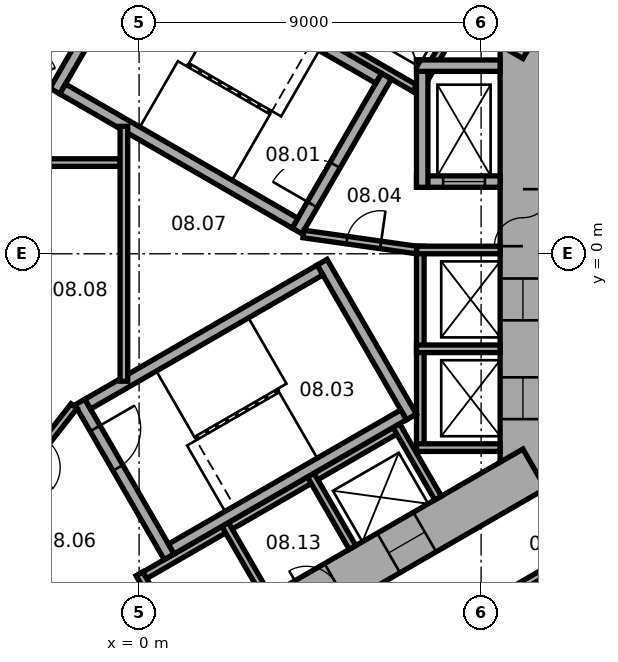
"""IFC4 building model, lengths in metres.
Left out: names, types, materials, properties, quantities, classifications, styles, units other than length and angle.
Written with IfcOpenShell. Run it as: python <this file> out.ifc"""

import sys

from ifc_helpers import new_model, si_unit, direction, frame, frame_2d, origin, place, context, subcontext, project, spatial, rectangle, extrude, element, fill, save


model = new_model("IFC4")
c1 = context("Model", 3, precision=1e-05, world=origin(), true_north=direction((0.0, 1.0)))
c2 = subcontext(c1, "Body", "Model", "MODEL_VIEW")
j1 = project(units=[si_unit("LENGTHUNIT", "METRE"), si_unit("PLANEANGLEUNIT", "RADIAN")], contexts=[c1])
p1 = place(None, origin())
s1 = spatial("IfcSite", under=j1, at=p1, CompositionType="ELEMENT")
p2 = place(p1, origin())
s2 = spatial("IfcBuilding", under=s1, at=p2, CompositionType="ELEMENT")
p3 = place(p2, frame((0.0, 0.0, 47.3)))
s3 = spatial("IfcBuildingStorey", under=s2, at=p3, CompositionType="ELEMENT", Elevation=47.3)
p4 = place(p3, frame((10.1, -6.177, 0.0), z_axis=(0.0, 0.0, 1.0), x_axis=(0.0, 1.0, 0.0)))
e1 = element("IfcWall", 1, at=p4, inside=s3, PredefinedType="SHEAR", context=c2, shape_type="SweptSolid", body=[
    extrude(rectangle(XDim=12.355, YDim=1.2, at=frame_2d((6.177, 0.0))), origin(), (0.0, 0.0, 1.0), 3.3),
])
p5 = place(p4, frame((6.378, 0.0, 0.0)))
e2 = element("IfcOpeningElement", 2, at=p5, cuts=e1, PredefinedType="OPENING", context=c2, shape_type="SweptSolid", body=[
    extrude(rectangle(XDim=1.5, YDim=2.1, at=frame_2d((0.75, 1.05))), frame((0.0, 0.61, 0.0), z_axis=(0.0, -1.0, 0.0), x_axis=(1.0, 0.0, 0.0)), (0.0, 0.0, 1.0), 1.22),
])
p6 = place(p4, frame((1.828, 0.0, 0.0)))
e3 = element("IfcOpeningElement", 3, at=p6, cuts=e1, PredefinedType="OPENING", context=c2, shape_type="SweptSolid", body=[
    extrude(rectangle(XDim=1.1, YDim=2.1, at=frame_2d((0.55, 1.05))), frame((0.0, 0.61, 0.0), z_axis=(0.0, -1.0, 0.0), x_axis=(1.0, 0.0, 0.0)), (0.0, 0.0, 1.0), 1.22),
])
p7 = place(p4, frame((4.427, 0.0, 0.0)))
e4 = element("IfcOpeningElement", 4, at=p7, cuts=e1, PredefinedType="OPENING", context=c2, shape_type="SweptSolid", body=[
    extrude(rectangle(XDim=1.1, YDim=2.1, at=frame_2d((0.55, 1.05))), frame((0.0, 0.61, 0.0), z_axis=(0.0, -1.0, 0.0), x_axis=(1.0, 0.0, 0.0)), (0.0, 0.0, 1.0), 1.22),
])
p8 = place(p3, frame((10.4, 5.658, 0.0), z_axis=(0.0, 0.0, 1.0), x_axis=(-0.866021384402, 0.500006961711, 0.0)))
e5 = element("IfcWall", 5, at=p8, inside=s3, PredefinedType="SHEAR", context=c2, shape_type="SweptSolid", body=[
    extrude(rectangle(XDim=12.355, YDim=1.2, at=frame_2d((6.178, 0.0))), origin(), (0.0, 0.0, 1.0), 3.3),
])
p9 = place(p8, frame((2.728, 0.0, 0.0)))
e6 = element("IfcOpeningElement", 6, at=p9, cuts=e5, PredefinedType="OPENING", context=c2, shape_type="SweptSolid", body=[
    extrude(rectangle(XDim=1.1, YDim=2.1, at=frame_2d((0.55, 1.05))), frame((0.0, 0.61, 0.0), z_axis=(0.0, -1.0, 0.0), x_axis=(1.0, 0.0, 0.0)), (0.0, 0.0, 1.0), 1.22),
])
p10 = place(p8, frame((5.328, 0.0, 0.0)))
e7 = element("IfcOpeningElement", 7, at=p10, cuts=e5, PredefinedType="OPENING", context=c2, shape_type="SweptSolid", body=[
    extrude(rectangle(XDim=1.1, YDim=2.1, at=frame_2d((0.55, 1.05))), frame((0.0, 0.61, 0.0), z_axis=(0.0, -1.0, 0.0), x_axis=(1.0, 0.0, 0.0)), (0.0, 0.0, 1.0), 1.22),
])
p11 = place(p8, frame((7.928, 0.0, 0.0)))
e8 = element("IfcOpeningElement", 8, at=p11, cuts=e5, PredefinedType="OPENING", context=c2, shape_type="SweptSolid", body=[
    extrude(rectangle(XDim=1.1, YDim=2.1, at=frame_2d((0.55, 1.05))), frame((0.0, 0.61, 0.0), z_axis=(0.0, -1.0, 0.0), x_axis=(1.0, 0.0, 0.0)), (0.0, 0.0, 1.0), 1.22),
])
p12 = place(p3, frame((0.3, 11.836, 0.0), z_axis=(0.0, 0.0, 1.0), x_axis=(-0.866021384402, -0.500006961711, 0.0)))
e9 = element("IfcWall", 9, at=p12, inside=s3, PredefinedType="SHEAR", context=c2, shape_type="SweptSolid", body=[
    extrude(rectangle(XDim=12.355, YDim=1.2, at=frame_2d((6.178, 0.0))), origin(), (0.0, 0.0, 1.0), 3.3),
])
p13 = place(p12, frame((6.378, 0.0, 0.0)))
e10 = element("IfcOpeningElement", 10, at=p13, cuts=e9, PredefinedType="OPENING", context=c2, shape_type="SweptSolid", body=[
    extrude(rectangle(XDim=1.5, YDim=2.1, at=frame_2d((0.75, 1.05))), frame((0.0, 0.61, 0.0), z_axis=(0.0, -1.0, 0.0), x_axis=(1.0, 0.0, 0.0)), (0.0, 0.0, 1.0), 1.22),
])
p14 = place(p12, frame((1.828, 0.0, 0.0)))
e11 = element("IfcOpeningElement", 11, at=p14, cuts=e9, PredefinedType="OPENING", context=c2, shape_type="SweptSolid", body=[
    extrude(rectangle(XDim=1.1, YDim=2.1, at=frame_2d((0.55, 1.05))), frame((0.0, 0.61, 0.0), z_axis=(0.0, -1.0, 0.0), x_axis=(1.0, 0.0, 0.0)), (0.0, 0.0, 1.0), 1.22),
])
p15 = place(p3, frame((-10.4, -5.658, 0.0), z_axis=(0.0, 0.0, 1.0), x_axis=(0.866021384402, -0.500006961711, 0.0)))
e12 = element("IfcWall", 12, at=p15, inside=s3, PredefinedType="SHEAR", context=c2, shape_type="SweptSolid", body=[
    extrude(rectangle(XDim=12.355, YDim=1.2, at=frame_2d((6.178, 0.0))), origin(), (0.0, 0.0, 1.0), 3.3),
])
p16 = place(p15, frame((6.378, 0.0, 0.0)))
e13 = element("IfcOpeningElement", 13, at=p16, cuts=e12, PredefinedType="OPENING", context=c2, shape_type="SweptSolid", body=[
    extrude(rectangle(XDim=1.5, YDim=2.1, at=frame_2d((0.75, 1.05))), frame((0.0, 0.61, 0.0), z_axis=(0.0, -1.0, 0.0), x_axis=(1.0, 0.0, 0.0)), (0.0, 0.0, 1.0), 1.22),
])
p17 = place(p15, frame((3.228, 0.0, 0.0)))
e14 = element("IfcOpeningElement", 14, at=p17, cuts=e12, PredefinedType="OPENING", context=c2, shape_type="SweptSolid", body=[
    extrude(rectangle(XDim=0.9, YDim=2.1, at=frame_2d((0.45, 1.05))), frame((0.0, 0.61, 0.0), z_axis=(0.0, -1.0, 0.0), x_axis=(1.0, 0.0, 0.0)), (0.0, 0.0, 1.0), 1.22),
])
p18 = place(p3, frame((-0.3, -11.836, 0.0), z_axis=(0.0, 0.0, 1.0), x_axis=(0.866021384402, 0.500006961711, 0.0)))
e15 = element("IfcWall", 15, at=p18, inside=s3, PredefinedType="SHEAR", context=c2, shape_type="SweptSolid", body=[
    extrude(rectangle(XDim=12.355, YDim=1.2, at=frame_2d((6.178, 0.0))), origin(), (0.0, 0.0, 1.0), 3.3),
])
p19 = place(p18, frame((2.828, 0.0, 0.0)))
e16 = element("IfcOpeningElement", 16, at=p19, cuts=e15, PredefinedType="OPENING", context=c2, shape_type="SweptSolid", body=[
    extrude(rectangle(XDim=0.9, YDim=2.1, at=frame_2d((0.45, 1.05))), frame((0.0, 0.61, 0.0), z_axis=(0.0, -1.0, 0.0), x_axis=(1.0, 0.0, 0.0)), (0.0, 0.0, 1.0), 1.22),
])
p20 = place(p18, frame((5.428, 0.0, 0.0)))
e17 = element("IfcOpeningElement", 17, at=p20, cuts=e15, PredefinedType="OPENING", context=c2, shape_type="SweptSolid", body=[
    extrude(rectangle(XDim=0.9, YDim=2.1, at=frame_2d((0.45, 1.05))), frame((0.0, 0.61, 0.0), z_axis=(0.0, -1.0, 0.0), x_axis=(1.0, 0.0, 0.0)), (0.0, 0.0, 1.0), 1.22),
])
p21 = place(p18, frame((7.928, 0.0, 0.0)))
e18 = element("IfcOpeningElement", 18, at=p21, cuts=e15, PredefinedType="OPENING", context=c2, shape_type="SweptSolid", body=[
    extrude(rectangle(XDim=1.1, YDim=2.1, at=frame_2d((0.55, 1.05))), frame((0.0, 0.61, 0.0), z_axis=(0.0, -1.0, 0.0), x_axis=(1.0, 0.0, 0.0)), (0.0, 0.0, 1.0), 1.22),
])
p22 = place(p3, frame((7.4, -5.2, 0.0), z_axis=(0.0, 0.0, 1.0), x_axis=(0.0, 1.0, 0.0)))
e19 = element("IfcWall", 19, at=p22, inside=s3, PredefinedType="PARTITIONING", context=c2, shape_type="SweptSolid", body=[
    extrude(rectangle(XDim=5.4, YDim=0.2, at=frame_2d((2.7, 0.0))), origin(), (0.0, 0.0, 1.0), 3.05),
])
for number, where, z_axis, x_axis in (
    (20, (7.3, -5.1, 0.0), (0.0, 0.0, 1.0), (1.0, 0.0, 0.0)),
    (21, (7.3, -2.5, 0.0), (0.0, 0.0, 1.0), (1.0, 0.0, 0.0)),
    (22, (7.3, 0.1, 0.0), (0.0, 0.0, 1.0), (1.0, 0.0, 0.0)),
):
    element("IfcWall", number, at=place(p3, frame(where, z_axis=z_axis, x_axis=x_axis)), inside=s3, PredefinedType="PARTITIONING", context=c2, shape_type="SweptSolid", body=[
        extrude(rectangle(XDim=2.2, YDim=0.2, at=frame_2d((1.1, 0.0))), origin(), (0.0, 0.0, 1.0), 3.05),
    ])
p23 = place(p3, frame((7.424, 4.259, 0.0), z_axis=(0.0, 0.0, 1.0), x_axis=(-0.866026010844, 0.49999894854, 0.0)))
e23 = element("IfcWall", 23, at=p23, inside=s3, PredefinedType="PARTITIONING", context=c2, shape_type="SweptSolid", body=[
    extrude(rectangle(XDim=8.0, YDim=0.2, at=frame_2d((4.0, 0.0))), origin(), (0.0, 0.0, 1.0), 3.05),
])
p24 = place(p3, frame((7.287, 4.222, 0.0), z_axis=(0.0, 0.0, 1.0), x_axis=(0.499946605688, 0.86605622881, 0.0)))
e24 = element("IfcWall", 24, at=p24, inside=s3, PredefinedType="PARTITIONING", context=c2, shape_type="SweptSolid", body=[
    extrude(rectangle(XDim=2.2, YDim=0.2, at=frame_2d((1.1, 0.0))), origin(), (0.0, 0.0, 1.0), 3.05),
])
p25 = place(p3, frame((-0.024, -8.559, 0.0), z_axis=(0.0, 0.0, 1.0), x_axis=(0.866026010844, 0.49999894854, 0.0)))
e25 = element("IfcWall", 25, at=p25, inside=s3, PredefinedType="PARTITIONING", context=c2, shape_type="SweptSolid", body=[
    extrude(rectangle(XDim=8.0, YDim=0.2, at=frame_2d((4.0, 0.0))), origin(), (0.0, 0.0, 1.0), 3.05),
])
for number, where, z_axis, x_axis in (
    (26, (0.013, -8.422, 0.0), (0.0, 0.0, 1.0), (0.5, -0.866, 0.0)),
    (27, (2.264, -7.122, 0.0), (0.0, 0.0, 1.0), (0.5, -0.866, 0.0)),
    (28, (4.516, -5.822, 0.0), (0.0, 0.0, 1.0), (0.5, -0.866, 0.0)),
    (29, (6.768, -4.522, 0.0), (0.0, 0.0, 1.0), (0.5, -0.866, 0.0)),
):
    element("IfcWall", number, at=place(p3, frame(where, z_axis=z_axis, x_axis=x_axis)), inside=s3, PredefinedType="PARTITIONING", context=c2, shape_type="SweptSolid", body=[
        extrude(rectangle(XDim=2.2, YDim=0.2, at=frame_2d((1.1, 0.0))), origin(), (0.0, 0.0, 1.0), 3.05),
    ])
p26 = place(p3, frame((4.158, 0.602, 0.0), z_axis=(0.0, 0.0, 1.0), x_axis=(0.499977259774, 0.866038532462, 0.0)))
e30 = element("IfcWall", 30, at=p26, inside=s3, PredefinedType="SHEAR", context=c2, shape_type="SweptSolid", body=[
    extrude(rectangle(XDim=4.7, YDim=0.3, at=frame_2d((2.35, 0.0))), origin(), (0.0, 0.0, 1.0), 3.05),
])
p27 = place(p26, frame((0.8, 0.0, 0.0)))
e31 = element("IfcOpeningElement", 31, at=p27, cuts=e30, PredefinedType="OPENING", context=c2, shape_type="SweptSolid", body=[
    extrude(rectangle(XDim=1.2, YDim=2.1, at=frame_2d((0.6, 1.05))), frame((0.0, 0.16, 0.0), z_axis=(0.0, -1.0, 0.0), x_axis=(1.0, 0.0, 0.0)), (0.0, 0.0, 1.0), 0.32),
])
p28 = place(p3, frame((-2.216, 4.282, 0.0), z_axis=(0.0, 0.0, 1.0), x_axis=(0.499977259774, 0.866038532462, 0.0)))
e32 = element("IfcWall", 32, at=p28, inside=s3, PredefinedType="SHEAR", context=c2, shape_type="SweptSolid", body=[
    extrude(rectangle(XDim=4.7, YDim=0.3, at=frame_2d((2.35, 0.0))), origin(), (0.0, 0.0, 1.0), 3.05),
])
for number, where, z_axis, x_axis in (
    (33, (4.103, 0.807, 0.0), (0.0, 0.0, 1.0), (-0.866, 0.5, 0.0)),
    (34, (6.303, 4.617, 0.0), (0.0, 0.0, 1.0), (-0.866, 0.5, 0.0)),
):
    element("IfcWall", number, at=place(p3, frame(where, z_axis=z_axis, x_axis=x_axis)), inside=s3, PredefinedType="SHEAR", context=c2, shape_type="SweptSolid", body=[
        extrude(rectangle(XDim=7.06, YDim=0.3, at=frame_2d((3.53, 0.0))), origin(), (0.0, 0.0, 1.0), 3.05),
    ])
p29 = place(p3, frame((-1.558, -3.902, 0.0), z_axis=(0.0, 0.0, 1.0), x_axis=(0.499977259774, -0.866038532462, 0.0)))
e35 = element("IfcWall", 35, at=p29, inside=s3, PredefinedType="SHEAR", context=c2, shape_type="SweptSolid", body=[
    extrude(rectangle(XDim=4.7, YDim=0.3, at=frame_2d((2.35, 0.0))), origin(), (0.0, 0.0, 1.0), 3.05),
])
p30 = place(p29, frame((0.8, 0.0, 0.0)))
e36 = element("IfcOpeningElement", 36, at=p30, cuts=e35, PredefinedType="OPENING", context=c2, shape_type="SweptSolid", body=[
    extrude(rectangle(XDim=1.2, YDim=2.1, at=frame_2d((0.6, 1.05))), frame((0.0, 0.16, 0.0), z_axis=(0.0, -1.0, 0.0), x_axis=(1.0, 0.0, 0.0)), (0.0, 0.0, 1.0), 0.32),
])
p31 = place(p3, frame((4.816, -0.222, 0.0), z_axis=(0.0, 0.0, 1.0), x_axis=(0.499977259774, -0.866038532462, 0.0)))
e37 = element("IfcWall", 37, at=p31, inside=s3, PredefinedType="SHEAR", context=c2, shape_type="SweptSolid", body=[
    extrude(rectangle(XDim=4.7, YDim=0.3, at=frame_2d((2.35, 0.0))), origin(), (0.0, 0.0, 1.0), 3.05),
])
for number, where, z_axis, x_axis in (
    (38, (-1.353, -3.957, 0.0), (0.0, 0.0, 1.0), (0.866, 0.5, 0.0)),
    (39, (0.847, -7.767, 0.0), (0.0, 0.0, 1.0), (0.866, 0.5, 0.0)),
):
    element("IfcWall", number, at=place(p3, frame(where, z_axis=z_axis, x_axis=x_axis)), inside=s3, PredefinedType="SHEAR", context=c2, shape_type="SweptSolid", body=[
        extrude(rectangle(XDim=7.06, YDim=0.3, at=frame_2d((3.53, 0.0))), origin(), (0.0, 0.0, 1.0), 3.05),
    ])
p32 = place(p3, frame((7.3, 1.9, 0.0), z_axis=(0.0, 0.0, 1.0), x_axis=(1.0, 0.0, 0.0)))
e40 = element("IfcWall", 40, at=p32, inside=s3, PredefinedType="SHEAR", context=c2, shape_type="SweptSolid", body=[
    extrude(rectangle(XDim=2.2, YDim=0.3, at=frame_2d((1.1, 0.0))), origin(), (0.0, 0.0, 1.0), 3.05),
])
p33 = place(p32, frame((0.7, 0.0, 0.0)))
e41 = element("IfcOpeningElement", 41, at=p33, cuts=e40, PredefinedType="OPENING", context=c2, shape_type="SweptSolid", body=[
    extrude(rectangle(XDim=1.1, YDim=2.1, at=frame_2d((0.55, 1.05))), frame((0.0, 0.16, 0.0), z_axis=(0.0, -1.0, 0.0), x_axis=(1.0, 0.0, 0.0)), (0.0, 0.0, 1.0), 0.32),
])
p34 = place(p3, frame((7.45, 1.75, 0.0), z_axis=(0.0, 0.0, 1.0), x_axis=(0.0, 1.0, 0.0)))
e42 = element("IfcWall", 42, at=p34, inside=s3, PredefinedType="SHEAR", context=c2, shape_type="SweptSolid", body=[
    extrude(rectangle(XDim=3.35, YDim=0.3, at=frame_2d((1.675, 0.0))), origin(), (0.0, 0.0, 1.0), 3.05),
])
p35 = place(p3, frame((7.3, 4.95, 0.0), z_axis=(0.0, 0.0, 1.0), x_axis=(1.0, 0.0, 0.0)))
e43 = element("IfcWall", 43, at=p35, inside=s3, PredefinedType="SHEAR", context=c2, shape_type="SweptSolid", body=[
    extrude(rectangle(XDim=2.2, YDim=0.3, at=frame_2d((1.1, 0.0))), origin(), (0.0, 0.0, 1.0), 3.05),
])
p36 = place(p3, frame((4.327, 0.521, 0.0), z_axis=(0.0, 0.0, 1.0), x_axis=(0.990124376366, -0.14019172346, 0.0)))
e44 = element("IfcWall", 44, at=p36, inside=s3, PredefinedType="PARTITIONING", context=c2, shape_type="SweptSolid", body=[
    extrude(rectangle(XDim=3.002, YDim=0.2, at=frame_2d((1.501, 0.0))), origin(), (0.0, 0.0, 1.0), 3.05),
])
p37 = place(p36, frame((1.15, 0.0, 0.0)))
e45 = element("IfcOpeningElement", 45, at=p37, cuts=e44, PredefinedType="OPENING", context=c2, shape_type="SweptSolid", body=[
    extrude(rectangle(XDim=0.9, YDim=2.1, at=frame_2d((0.45, 1.05))), frame((0.0, 0.11, 0.0), z_axis=(0.0, -1.0, 0.0), x_axis=(1.0, 0.0, 0.0)), (0.0, 0.0, 1.0), 0.22),
])
p38 = place(p3, frame((-1.712, -4.008, 0.0), z_axis=(0.0, 0.0, 1.0), x_axis=(-0.616549420702, -0.787316208287, 0.0)))
e46 = element("IfcWall", 46, at=p38, inside=s3, PredefinedType="PARTITIONING", context=c2, shape_type="SweptSolid", body=[
    extrude(rectangle(XDim=3.002, YDim=0.2, at=frame_2d((1.501, 0.0))), origin(), (0.0, 0.0, 1.0), 3.05),
])
p39 = place(p38, frame((1.15, 0.0, 0.0)))
e47 = element("IfcOpeningElement", 47, at=p39, cuts=e46, PredefinedType="OPENING", context=c2, shape_type="SweptSolid", body=[
    extrude(rectangle(XDim=0.9, YDim=2.1, at=frame_2d((0.45, 1.05))), frame((0.0, 0.11, 0.0), z_axis=(0.0, -1.0, 0.0), x_axis=(1.0, 0.0, 0.0)), (0.0, 0.0, 1.0), 0.22),
])
p40 = place(p3, frame((-2.72, 2.4, 0.0), z_axis=(0.0, 0.0, 1.0), x_axis=(1.0, 0.0, 0.0)))
e48 = element("IfcWall", 48, at=p40, inside=s3, PredefinedType="PARTITIONING", context=c2, shape_type="SweptSolid", body=[
    extrude(rectangle(XDim=2.22, YDim=0.2, at=frame_2d((1.11, 0.0))), origin(), (0.0, 0.0, 1.0), 3.05),
])
p41 = place(p3, frame((-0.4, -3.353, 0.0), z_axis=(0.0, 0.0, 1.0), x_axis=(0.0, 1.0, 0.0)))
e49 = element("IfcWall", 49, at=p41, inside=s3, PredefinedType="PARTITIONING", context=c2, shape_type="SweptSolid", body=[
    extrude(rectangle(XDim=6.707, YDim=0.2, at=frame_2d((3.353, 0.0))), origin(), (0.0, 0.0, 1.0), 3.05),
])
p42 = place(p3, frame((-11.615, -7.843, 0.0), z_axis=(0.0, 0.0, 1.0), x_axis=(0.866026466995, -0.499998158461, 0.0)))
e50 = element("IfcWall", 50, at=p42, inside=s3, PredefinedType="PARTITIONING", context=c2, shape_type="SweptSolid", body=[
    extrude(rectangle(XDim=12.315, YDim=0.2, at=frame_2d((6.158, 0.0))), origin(), (0.0, 0.0, 1.0), 3.05),
])
p43 = place(p42, frame((1.665, 0.0, 0.0)))
e51 = element("IfcOpeningElement", 51, at=p43, cuts=e50, PredefinedType="OPENING", context=c2, shape_type="SweptSolid", body=[
    extrude(rectangle(XDim=0.9, YDim=2.1, at=frame_2d((0.45, 1.05))), frame((0.0, 0.11, 0.0), z_axis=(0.0, -1.0, 0.0), x_axis=(1.0, 0.0, 0.0)), (0.0, 0.0, 1.0), 0.22),
])
p44 = place(p42, frame((9.787, 0.0, 0.0)))
e52 = element("IfcOpeningElement", 52, at=p44, cuts=e50, PredefinedType="OPENING", context=c2, shape_type="SweptSolid", body=[
    extrude(rectangle(XDim=0.9, YDim=2.1, at=frame_2d((0.45, 1.05))), frame((0.0, 0.11, 0.0), z_axis=(0.0, -1.0, 0.0), x_axis=(1.0, 0.0, 0.0)), (0.0, 0.0, 1.0), 0.22),
])
p45 = place(p3, frame((9.852, -8.861, 0.0), z_axis=(0.0, 0.0, 1.0), x_axis=(0.866013291437, 0.500020978615, 0.0)))
e53 = element("IfcWall", 53, at=p45, inside=s3, PredefinedType="PARTITIONING", context=c2, shape_type="SweptSolid", body=[
    extrude(rectangle(XDim=2.077, YDim=0.2, at=frame_2d((1.038, 0.0))), origin(), (0.0, 0.0, 1.0), 3.05),
])
p46 = place(p5, origin())
e54 = element("IfcDoor", 54, at=p46, inside=s3, OperationType="DOUBLE_DOOR_SINGLE_SWING", PredefinedType="DOOR", context=c2, shape_type="SweptSolid", body=[
    extrude(rectangle(XDim=1.5, YDim=2.1, at=frame_2d((0.75, 1.05))), frame((0.0, 0.025, 0.0), z_axis=(0.0, -1.0, 0.0), x_axis=(1.0, 0.0, 0.0)), (0.0, 0.0, 1.0), 0.05),
])
fill(e2, e54)
p47 = place(p27, origin())
e55 = element("IfcDoor", 55, at=p47, inside=s3, OperationType="SINGLE_SWING_RIGHT", PredefinedType="DOOR", context=c2, shape_type="SweptSolid", body=[
    extrude(rectangle(XDim=1.2, YDim=2.1, at=frame_2d((0.6, 1.05))), frame((0.0, 0.025, 0.0), z_axis=(0.0, -1.0, 0.0), x_axis=(1.0, 0.0, 0.0)), (0.0, 0.0, 1.0), 0.05),
])
fill(e31, e55)
p48 = place(p30, origin())
e56 = element("IfcDoor", 56, at=p48, inside=s3, OperationType="SINGLE_SWING_RIGHT", PredefinedType="DOOR", context=c2, shape_type="SweptSolid", body=[
    extrude(rectangle(XDim=1.2, YDim=2.1, at=frame_2d((0.6, 1.05))), frame((0.0, 0.025, 0.0), z_axis=(0.0, -1.0, 0.0), x_axis=(1.0, 0.0, 0.0)), (0.0, 0.0, 1.0), 0.05),
])
fill(e36, e56)
p49 = place(p37, origin())
e57 = element("IfcDoor", 57, at=p49, inside=s3, OperationType="SINGLE_SWING_LEFT", PredefinedType="DOOR", context=c2, shape_type="SweptSolid", body=[
    extrude(rectangle(XDim=0.9, YDim=2.1, at=frame_2d((0.45, 1.05))), frame((0.0, 0.025, 0.0), z_axis=(0.0, -1.0, 0.0), x_axis=(1.0, 0.0, 0.0)), (0.0, 0.0, 1.0), 0.05),
])
fill(e45, e57)
p50 = place(p33, origin())
e58 = element("IfcDoor", 58, at=p50, inside=s3, OperationType="DOUBLE_DOOR_SLIDING", PredefinedType="DOOR", context=c2, shape_type="SweptSolid", body=[
    extrude(rectangle(XDim=1.1, YDim=2.1, at=frame_2d((0.55, 1.05))), frame((0.0, 0.025, 0.0), z_axis=(0.0, -1.0, 0.0), x_axis=(1.0, 0.0, 0.0)), (0.0, 0.0, 1.0), 0.05),
])
fill(e41, e58)
p51 = place(p6, origin())
e59 = element("IfcDoor", 59, at=p51, inside=s3, OperationType="DOUBLE_DOOR_SLIDING", PredefinedType="DOOR", context=c2, shape_type="SweptSolid", body=[
    extrude(rectangle(XDim=1.1, YDim=2.1, at=frame_2d((0.55, 1.05))), frame((0.0, 0.025, 0.0), z_axis=(0.0, -1.0, 0.0), x_axis=(1.0, 0.0, 0.0)), (0.0, 0.0, 1.0), 0.05),
])
fill(e3, e59)
p52 = place(p7, origin())
e60 = element("IfcDoor", 60, at=p52, inside=s3, OperationType="DOUBLE_DOOR_SLIDING", PredefinedType="DOOR", context=c2, shape_type="SweptSolid", body=[
    extrude(rectangle(XDim=1.1, YDim=2.1, at=frame_2d((0.55, 1.05))), frame((0.0, 0.025, 0.0), z_axis=(0.0, -1.0, 0.0), x_axis=(1.0, 0.0, 0.0)), (0.0, 0.0, 1.0), 0.05),
])
fill(e4, e60)
p53 = place(p21, origin())
e61 = element("IfcDoor", 61, at=p53, inside=s3, OperationType="DOUBLE_DOOR_SLIDING", PredefinedType="DOOR", context=c2, shape_type="SweptSolid", body=[
    extrude(rectangle(XDim=1.1, YDim=2.1, at=frame_2d((0.55, 1.05))), frame((0.0, 0.025, 0.0), z_axis=(0.0, -1.0, 0.0), x_axis=(1.0, 0.0, 0.0)), (0.0, 0.0, 1.0), 0.05),
])
fill(e18, e61)
save(model, sys.argv[1])
